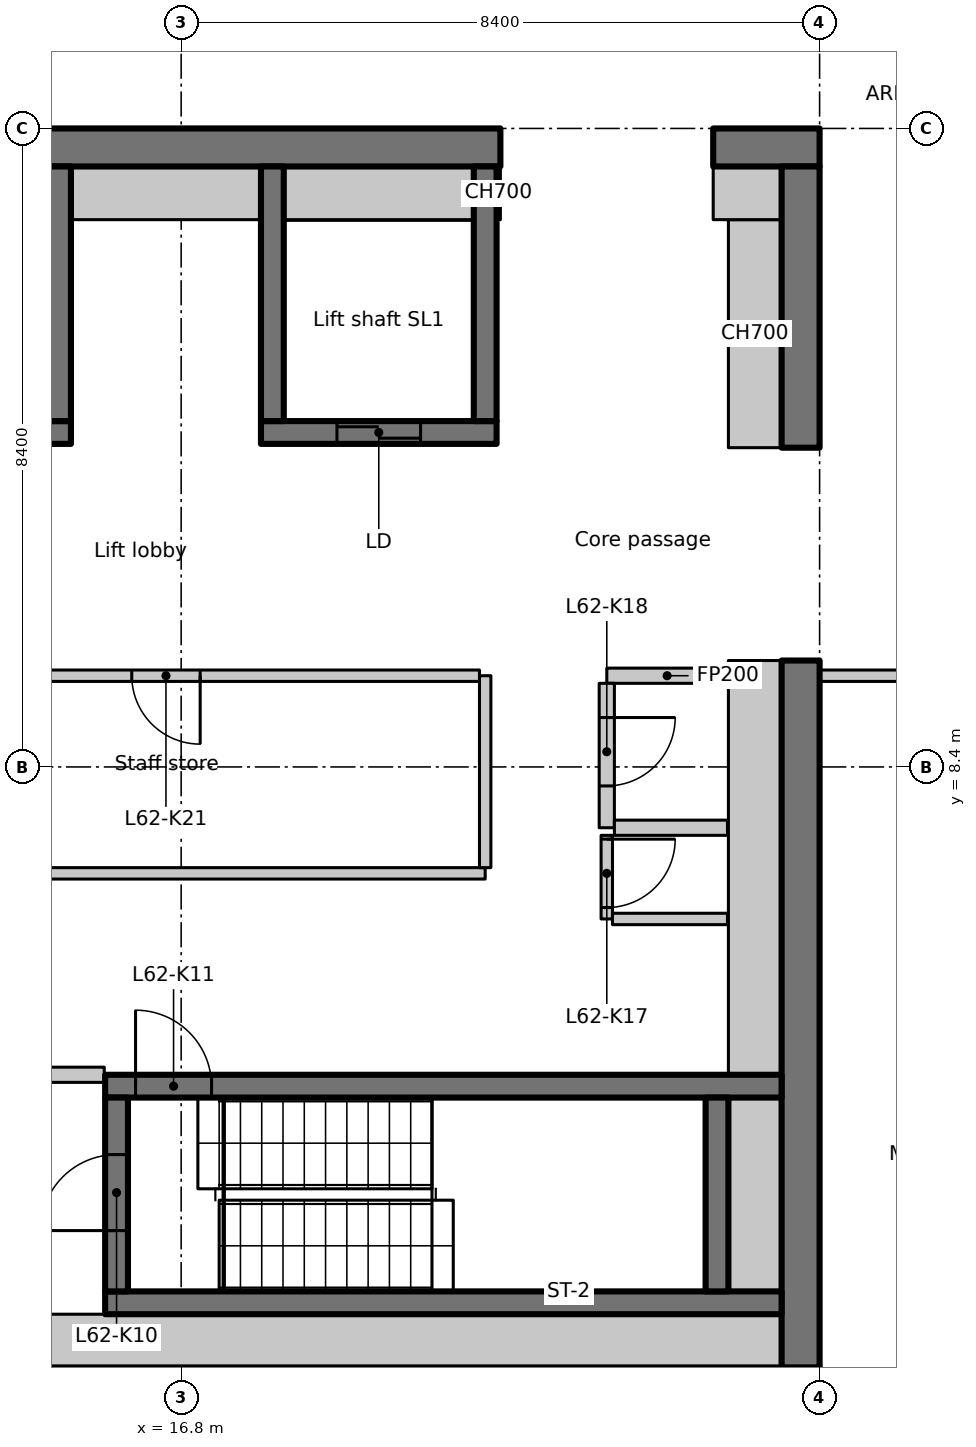
"""IFC4 building model, lengths in metres.
Left out: names, types, materials, properties, quantities, classifications, styles, units other than length and angle.
Written with IfcOpenShell. Run it as: python <this file> out.ifc"""

import sys

from ifc_helpers import new_model, si_unit, direction, frame, frame_2d, origin, place, context, subcontext, project, spatial, rectangle, extrude, element, fill, save


model = new_model("IFC4")
c1 = context("Model", 3, precision=1e-05, world=origin(), true_north=direction((0.0, 1.0)))
c2 = subcontext(c1, "Body", "Model", "MODEL_VIEW")
j1 = project(units=[si_unit("LENGTHUNIT", "METRE"), si_unit("PLANEANGLEUNIT", "RADIAN")], contexts=[c1])
p1 = place(None, origin())
s1 = spatial("IfcSite", under=j1, at=p1, CompositionType="ELEMENT")
p2 = place(p1, origin())
s2 = spatial("IfcBuilding", under=s1, at=p2, CompositionType="ELEMENT")
p3 = place(p2, frame((0.0, 0.0, 244.5)))
s3 = spatial("IfcBuildingStorey", under=s2, at=p3, CompositionType="ELEMENT", Elevation=244.5)
p4 = place(p3, frame((-1.1, 16.55, 0.0), z_axis=(0.0, 0.0, 1.0), x_axis=(1.0, 0.0, 0.0)))
e1 = element("IfcWall", 1, at=p4, inside=s3, PredefinedType="SHEAR", context=c2, shape_type="SweptSolid", body=[
    extrude(rectangle(XDim=22.1, YDim=0.5, at=frame_2d((11.05, 0.0))), origin(), (0.0, 0.0, 1.0), 3.35),
])
p5 = place(p4, frame((3.15, 0.0, 0.0)))
e2 = element("IfcOpeningElement", 2, at=p5, cuts=e1, PredefinedType="OPENING", context=c2, shape_type="SweptSolid", body=[
    extrude(rectangle(XDim=1.1, YDim=2.3, at=frame_2d((0.55, 1.15))), frame((0.0, 0.26, 0.0), z_axis=(0.0, -1.0, 0.0), x_axis=(1.0, 0.0, 0.0)), (0.0, 0.0, 1.0), 0.52),
])
p6 = place(p3, frame((23.8, 16.55, 0.0), z_axis=(0.0, 0.0, 1.0), x_axis=(1.0, 0.0, 0.0)))
e3 = element("IfcWall", 3, at=p6, inside=s3, PredefinedType="SHEAR", context=c2, shape_type="SweptSolid", body=[
    extrude(rectangle(XDim=1.4, YDim=0.5, at=frame_2d((0.7, 0.0))), origin(), (0.0, 0.0, 1.0), 3.35),
])
p7 = place(p3, frame((24.95, 0.5, 0.0), z_axis=(0.0, 0.0, 1.0), x_axis=(0.0, 1.0, 0.0)))
e4 = element("IfcWall", 4, at=p7, inside=s3, PredefinedType="SHEAR", context=c2, shape_type="SweptSolid", body=[
    extrude(rectangle(XDim=9.3, YDim=0.5, at=frame_2d((4.65, 0.0))), origin(), (0.0, 0.0, 1.0), 3.35),
])
p8 = place(p3, frame((24.95, 12.6, 0.0), z_axis=(0.0, 0.0, 1.0), x_axis=(0.0, 1.0, 0.0)))
e5 = element("IfcWall", 5, at=p8, inside=s3, PredefinedType="SHEAR", context=c2, shape_type="SweptSolid", body=[
    extrude(rectangle(XDim=3.7, YDim=0.5, at=frame_2d((1.85, 0.0))), origin(), (0.0, 0.0, 1.0), 3.35),
])
p9 = place(p3, frame((24.35, 12.6, 0.0), z_axis=(0.0, 0.0, 1.0), x_axis=(0.0, 1.0, 0.0)))
e6 = element("IfcWall", 6, at=p9, inside=s3, PredefinedType="PARTITIONING", context=c2, shape_type="SweptSolid", body=[
    extrude(rectangle(XDim=3.0, YDim=0.7, at=frame_2d((1.5, 0.0))), origin(), (0.0, 0.0, 1.0), 3.35),
])
p10 = place(p3, frame((23.8, 15.95, 0.0), z_axis=(0.0, 0.0, 1.0), x_axis=(1.0, 0.0, 0.0)))
e7 = element("IfcWall", 7, at=p10, inside=s3, PredefinedType="PARTITIONING", context=c2, shape_type="SweptSolid", body=[
    extrude(rectangle(XDim=0.9, YDim=0.7, at=frame_2d((0.45, 0.0))), origin(), (0.0, 0.0, 1.0), 3.35),
])
p11 = place(p3, frame((0.5, 12.8, 0.0), z_axis=(0.0, 0.0, 1.0), x_axis=(1.0, 0.0, 0.0)))
e8 = element("IfcWall", 8, at=p11, inside=s3, PredefinedType="SHEAR", context=c2, shape_type="SweptSolid", body=[
    extrude(rectangle(XDim=14.85, YDim=0.3, at=frame_2d((7.425, 0.0))), origin(), (0.0, 0.0, 1.0), 3.35),
])
p12 = place(p11, frame((4.35, 0.0, 0.0)))
e9 = element("IfcOpeningElement", 9, at=p12, cuts=e8, PredefinedType="OPENING", context=c2, shape_type="SweptSolid", body=[
    extrude(rectangle(XDim=1.1, YDim=2.3, at=frame_2d((0.55, 1.15))), frame((0.0, 0.16, 0.0), z_axis=(0.0, -1.0, 0.0), x_axis=(1.0, 0.0, 0.0)), (0.0, 0.0, 1.0), 0.32),
])
p13 = place(p11, frame((7.15, 0.0, 0.0)))
e10 = element("IfcOpeningElement", 10, at=p13, cuts=e8, PredefinedType="OPENING", context=c2, shape_type="SweptSolid", body=[
    extrude(rectangle(XDim=1.1, YDim=2.3, at=frame_2d((0.55, 1.15))), frame((0.0, 0.16, 0.0), z_axis=(0.0, -1.0, 0.0), x_axis=(1.0, 0.0, 0.0)), (0.0, 0.0, 1.0), 0.32),
])
p14 = place(p11, frame((9.95, 0.0, 0.0)))
e11 = element("IfcOpeningElement", 11, at=p14, cuts=e8, PredefinedType="OPENING", context=c2, shape_type="SweptSolid", body=[
    extrude(rectangle(XDim=1.1, YDim=2.3, at=frame_2d((0.55, 1.15))), frame((0.0, 0.16, 0.0), z_axis=(0.0, -1.0, 0.0), x_axis=(1.0, 0.0, 0.0)), (0.0, 0.0, 1.0), 0.32),
])
p15 = place(p11, frame((12.75, 0.0, 0.0)))
e12 = element("IfcOpeningElement", 12, at=p15, cuts=e8, PredefinedType="OPENING", context=c2, shape_type="SweptSolid", body=[
    extrude(rectangle(XDim=1.1, YDim=2.3, at=frame_2d((0.55, 1.15))), frame((0.0, 0.16, 0.0), z_axis=(0.0, -1.0, 0.0), x_axis=(1.0, 0.0, 0.0)), (0.0, 0.0, 1.0), 0.32),
])
p16 = place(p3, frame((15.2, 12.95, 0.0), z_axis=(0.0, 0.0, 1.0), x_axis=(0.0, 1.0, 0.0)))
e13 = element("IfcWall", 13, at=p16, inside=s3, PredefinedType="SHEAR", context=c2, shape_type="SweptSolid", body=[
    extrude(rectangle(XDim=3.35, YDim=0.3, at=frame_2d((1.675, 0.0))), origin(), (0.0, 0.0, 1.0), 3.35),
])
p17 = place(p3, frame((17.85, 12.8, 0.0), z_axis=(0.0, 0.0, 1.0), x_axis=(1.0, 0.0, 0.0)))
e14 = element("IfcWall", 14, at=p17, inside=s3, PredefinedType="SHEAR", context=c2, shape_type="SweptSolid", body=[
    extrude(rectangle(XDim=3.1, YDim=0.3, at=frame_2d((1.55, 0.0))), origin(), (0.0, 0.0, 1.0), 3.35),
])
p18 = place(p17, frame((1.0, 0.0, 0.0)))
e15 = element("IfcOpeningElement", 15, at=p18, cuts=e14, PredefinedType="OPENING", context=c2, shape_type="SweptSolid", body=[
    extrude(rectangle(XDim=1.1, YDim=2.3, at=frame_2d((0.55, 1.15))), frame((0.0, 0.16, 0.0), z_axis=(0.0, -1.0, 0.0), x_axis=(1.0, 0.0, 0.0)), (0.0, 0.0, 1.0), 0.32),
])
for number, where, z_axis, x_axis in (
    (16, (18.0, 12.95, 0.0), (0.0, 0.0, 1.0), (0.0, 1.0, 0.0)),
    (17, (20.8, 12.95, 0.0), (0.0, 0.0, 1.0), (0.0, 1.0, 0.0)),
):
    element("IfcWall", number, at=place(p3, frame(where, z_axis=z_axis, x_axis=x_axis)), inside=s3, PredefinedType="SHEAR", context=c2, shape_type="SweptSolid", body=[
        extrude(rectangle(XDim=3.35, YDim=0.3, at=frame_2d((1.675, 0.0))), origin(), (0.0, 0.0, 1.0), 3.35),
    ])
p19 = place(p3, frame((15.8, 1.35, 0.0), z_axis=(0.0, 0.0, 1.0), x_axis=(1.0, 0.0, 0.0)))
e18 = element("IfcWall", 18, at=p19, inside=s3, PredefinedType="SHEAR", context=c2, shape_type="SweptSolid", body=[
    extrude(rectangle(XDim=8.9, YDim=0.3, at=frame_2d((4.45, 0.0))), origin(), (0.0, 0.0, 1.0), 3.35),
])
p20 = place(p3, frame((15.8, 4.2, 0.0), z_axis=(0.0, 0.0, 1.0), x_axis=(1.0, 0.0, 0.0)))
e19 = element("IfcWall", 19, at=p20, inside=s3, PredefinedType="SHEAR", context=c2, shape_type="SweptSolid", body=[
    extrude(rectangle(XDim=8.9, YDim=0.3, at=frame_2d((4.45, 0.0))), origin(), (0.0, 0.0, 1.0), 3.35),
])
p21 = place(p20, frame((0.4, 0.0, 0.0)))
e20 = element("IfcOpeningElement", 20, at=p21, cuts=e19, PredefinedType="OPENING", context=c2, shape_type="SweptSolid", body=[
    extrude(rectangle(XDim=1.0, YDim=2.1, at=frame_2d((0.5, 1.05))), frame((0.0, 0.16, 0.0), z_axis=(0.0, -1.0, 0.0), x_axis=(1.0, 0.0, 0.0)), (0.0, 0.0, 1.0), 0.32),
])
p22 = place(p3, frame((15.95, 1.5, 0.0), z_axis=(0.0, 0.0, 1.0), x_axis=(0.0, 1.0, 0.0)))
e21 = element("IfcWall", 21, at=p22, inside=s3, PredefinedType="SHEAR", context=c2, shape_type="SweptSolid", body=[
    extrude(rectangle(XDim=2.55, YDim=0.3, at=frame_2d((1.275, 0.0))), origin(), (0.0, 0.0, 1.0), 3.35),
])
p23 = place(p22, frame((0.8, 0.0, 0.0)))
e22 = element("IfcOpeningElement", 22, at=p23, cuts=e21, PredefinedType="OPENING", context=c2, shape_type="SweptSolid", body=[
    extrude(rectangle(XDim=1.0, YDim=2.1, at=frame_2d((0.5, 1.05))), frame((0.0, 0.16, 0.0), z_axis=(0.0, -1.0, 0.0), x_axis=(1.0, 0.0, 0.0)), (0.0, 0.0, 1.0), 0.32),
])
p24 = place(p3, frame((23.85, 1.5, 0.0), z_axis=(0.0, 0.0, 1.0), x_axis=(0.0, 1.0, 0.0)))
e23 = element("IfcWall", 23, at=p24, inside=s3, PredefinedType="SHEAR", context=c2, shape_type="SweptSolid", body=[
    extrude(rectangle(XDim=2.55, YDim=0.3, at=frame_2d((1.275, 0.0))), origin(), (0.0, 0.0, 1.0), 3.35),
])
p25 = place(p3, frame((13.362, 4.35, 0.0), z_axis=(0.0, 0.0, 1.0), x_axis=(1.0, 0.0, 0.0)))
e24 = element("IfcWall", 24, at=p25, inside=s3, PredefinedType="PARTITIONING", context=c2, shape_type="SweptSolid", body=[
    extrude(rectangle(XDim=2.426, YDim=0.2, at=frame_2d((1.213, 0.0))), origin(), (0.0, 0.0, 1.0), 3.35),
])
p26 = place(p25, frame((0.638, 0.0, 0.0)))
e25 = element("IfcOpeningElement", 25, at=p26, cuts=e24, PredefinedType="OPENING", context=c2, shape_type="SweptSolid", body=[
    extrude(rectangle(XDim=1.0, YDim=2.1, at=frame_2d((0.5, 1.05))), frame((0.0, 0.11, 0.0), z_axis=(0.0, -1.0, 0.0), x_axis=(1.0, 0.0, 0.0)), (0.0, 0.0, 1.0), 0.22),
])
p27 = place(p3, frame((23.988, 9.6, 0.0), z_axis=(0.0, 0.0, 1.0), x_axis=(-1.0, 0.0, 0.0)))
e26 = element("IfcWall", 26, at=p27, inside=s3, PredefinedType="PARTITIONING", context=c2, shape_type="SweptSolid", body=[
    extrude(rectangle(XDim=1.588, YDim=0.2, at=frame_2d((0.794, 0.0))), origin(), (0.0, 0.0, 1.0), 3.35),
])
p28 = place(p3, frame((22.4, 9.5, 0.0), z_axis=(0.0, 0.0, 1.0), x_axis=(0.0, -1.0, 0.0)))
e27 = element("IfcWall", 27, at=p28, inside=s3, PredefinedType="PARTITIONING", context=c2, shape_type="SweptSolid", body=[
    extrude(rectangle(XDim=1.9, YDim=0.2, at=frame_2d((0.95, 0.0))), origin(), (0.0, 0.0, 1.0), 3.35),
])
p29 = place(p28, frame((0.45, 0.0, 0.0)))
e28 = element("IfcOpeningElement", 28, at=p29, cuts=e27, PredefinedType="OPENING", context=c2, shape_type="SweptSolid", body=[
    extrude(rectangle(XDim=0.9, YDim=2.1, at=frame_2d((0.45, 1.05))), frame((0.0, 0.11, 0.0), z_axis=(0.0, -1.0, 0.0), x_axis=(1.0, 0.0, 0.0)), (0.0, 0.0, 1.0), 0.22),
])
p30 = place(p3, frame((22.5, 7.6, 0.0), z_axis=(0.0, 0.0, 1.0), x_axis=(1.0, 0.0, 0.0)))
e29 = element("IfcWall", 29, at=p30, inside=s3, PredefinedType="PARTITIONING", context=c2, shape_type="SweptSolid", body=[
    extrude(rectangle(XDim=1.488, YDim=0.2, at=frame_2d((0.744, 0.0))), origin(), (0.0, 0.0, 1.0), 3.35),
])
p31 = place(p3, frame((12.5, 7.0, 0.0), z_axis=(0.0, 0.0, 1.0), x_axis=(1.0, 0.0, 0.0)))
e30 = element("IfcWall", 30, at=p31, inside=s3, PredefinedType="PARTITIONING", context=c2, shape_type="SweptSolid", body=[
    extrude(rectangle(XDim=8.3, YDim=0.15, at=frame_2d((4.15, 0.0))), origin(), (0.0, 0.0, 1.0), 3.35),
])
p32 = place(p3, frame((20.8, 7.075, 0.0), z_axis=(0.0, 0.0, 1.0), x_axis=(0.0, 1.0, 0.0)))
e31 = element("IfcWall", 31, at=p32, inside=s3, PredefinedType="PARTITIONING", context=c2, shape_type="SweptSolid", body=[
    extrude(rectangle(XDim=2.525, YDim=0.15, at=frame_2d((1.263, 0.0))), origin(), (0.0, 0.0, 1.0), 3.35),
])
p33 = place(p3, frame((20.725, 9.6, 0.0), z_axis=(0.0, 0.0, 1.0), x_axis=(-1.0, 0.0, 0.0)))
e32 = element("IfcWall", 32, at=p33, inside=s3, PredefinedType="PARTITIONING", context=c2, shape_type="SweptSolid", body=[
    extrude(rectangle(XDim=8.225, YDim=0.15, at=frame_2d((4.113, 0.0))), origin(), (0.0, 0.0, 1.0), 3.35),
])
p34 = place(p33, frame((3.675, 0.0, 0.0)))
e33 = element("IfcOpeningElement", 33, at=p34, cuts=e32, PredefinedType="OPENING", context=c2, shape_type="SweptSolid", body=[
    extrude(rectangle(XDim=0.9, YDim=2.1, at=frame_2d((0.45, 1.05))), frame((0.0, 0.085, 0.0), z_axis=(0.0, -1.0, 0.0), x_axis=(1.0, 0.0, 0.0)), (0.0, 0.0, 1.0), 0.17),
])
p35 = place(p3, frame((22.4, 7.5, 0.0), z_axis=(0.0, 0.0, 1.0), x_axis=(0.0, -1.0, 0.0)))
e34 = element("IfcWall", 34, at=p35, inside=s3, PredefinedType="PARTITIONING", context=c2, shape_type="SweptSolid", body=[
    extrude(rectangle(XDim=1.1, YDim=0.15, at=frame_2d((0.55, 0.0))), origin(), (0.0, 0.0, 1.0), 3.35),
])
p36 = place(p35, frame((0.05, 0.0, 0.0)))
e35 = element("IfcOpeningElement", 35, at=p36, cuts=e34, PredefinedType="OPENING", context=c2, shape_type="SweptSolid", body=[
    extrude(rectangle(XDim=0.9, YDim=2.1, at=frame_2d((0.45, 1.05))), frame((0.0, 0.085, 0.0), z_axis=(0.0, -1.0, 0.0), x_axis=(1.0, 0.0, 0.0)), (0.0, 0.0, 1.0), 0.17),
])
p37 = place(p3, frame((22.475, 6.4, 0.0), z_axis=(0.0, 0.0, 1.0), x_axis=(1.0, 0.0, 0.0)))
e36 = element("IfcWall", 36, at=p37, inside=s3, PredefinedType="PARTITIONING", context=c2, shape_type="SweptSolid", body=[
    extrude(rectangle(XDim=1.513, YDim=0.15, at=frame_2d((0.756, 0.0))), origin(), (0.0, 0.0, 1.0), 3.35),
])
for number, where, z_axis, x_axis in (
    (37, (15.35, 15.95, 0.0), (0.0, 0.0, 1.0), (1.0, 0.0, 0.0)),
    (38, (18.15, 15.95, 0.0), (0.0, 0.0, 1.0), (1.0, 0.0, 0.0)),
):
    element("IfcWall", number, at=place(p3, frame(where, z_axis=z_axis, x_axis=x_axis)), inside=s3, PredefinedType="PARTITIONING", context=c2, shape_type="SweptSolid", body=[
        extrude(rectangle(XDim=2.5, YDim=0.7, at=frame_2d((1.25, 0.0))), origin(), (0.0, 0.0, 1.0), 3.35),
    ])
p38 = place(p3, frame((20.95, 15.95, 0.0), z_axis=(0.0, 0.0, 1.0), x_axis=(1.0, 0.0, 0.0)))
e39 = element("IfcWall", 39, at=p38, inside=s3, PredefinedType="PARTITIONING", context=c2, shape_type="SweptSolid", body=[
    extrude(rectangle(XDim=0.05, YDim=0.7, at=frame_2d((0.025, 0.0))), origin(), (0.0, 0.0, 1.0), 3.35),
])
p39 = place(p3, frame((13.35, 0.85, 0.0), z_axis=(0.0, 0.0, 1.0), x_axis=(1.0, 0.0, 0.0)))
e40 = element("IfcWall", 40, at=p39, inside=s3, PredefinedType="PARTITIONING", context=c2, shape_type="SweptSolid", body=[
    extrude(rectangle(XDim=11.35, YDim=0.7, at=frame_2d((5.675, 0.0))), origin(), (0.0, 0.0, 1.0), 3.35),
])
p40 = place(p3, frame((24.35, 1.5, 0.0), z_axis=(0.0, 0.0, 1.0), x_axis=(0.0, 1.0, 0.0)))
e41 = element("IfcWall", 41, at=p40, inside=s3, PredefinedType="PARTITIONING", context=c2, shape_type="SweptSolid", body=[
    extrude(rectangle(XDim=2.55, YDim=0.7, at=frame_2d((1.275, 0.0))), origin(), (0.0, 0.0, 1.0), 3.35),
])
p41 = place(p3, frame((24.35, 4.35, 0.0), z_axis=(0.0, 0.0, 1.0), x_axis=(0.0, 1.0, 0.0)))
e42 = element("IfcWall", 42, at=p41, inside=s3, PredefinedType="PARTITIONING", context=c2, shape_type="SweptSolid", body=[
    extrude(rectangle(XDim=5.45, YDim=0.7, at=frame_2d((2.725, 0.0))), origin(), (0.0, 0.0, 1.0), 3.35),
])
p42 = place(p3, frame((29.4, 9.6, 0.0), z_axis=(0.0, 0.0, 1.0), x_axis=(-1.0, 0.0, 0.0)))
e43 = element("IfcWall", 43, at=p42, inside=s3, PredefinedType="PARTITIONING", context=c2, shape_type="SweptSolid", body=[
    extrude(rectangle(XDim=4.2, YDim=0.15, at=frame_2d((2.1, 0.0))), origin(), (0.0, 0.0, 1.0), 3.33),
])
p43 = place(p42, frame((1.5, 0.0, 0.0)))
e44 = element("IfcOpeningElement", 44, at=p43, cuts=e43, PredefinedType="OPENING", context=c2, shape_type="SweptSolid", body=[
    extrude(rectangle(XDim=1.1, YDim=2.1, at=frame_2d((0.55, 1.05))), frame((0.0, 0.085, 0.0), z_axis=(0.0, -1.0, 0.0), x_axis=(1.0, 0.0, 0.0)), (0.0, 0.0, 1.0), 0.17),
])
p44 = place(p18, origin())
e45 = element("IfcDoor", 45, at=p44, inside=s3, OperationType="SLIDING_TO_LEFT", PredefinedType="DOOR", context=c2, shape_type="SweptSolid", body=[
    extrude(rectangle(XDim=1.1, YDim=2.3, at=frame_2d((0.55, 1.15))), frame((0.0, 0.025, 0.0), z_axis=(0.0, -1.0, 0.0), x_axis=(1.0, 0.0, 0.0)), (0.0, 0.0, 1.0), 0.05),
])
fill(e15, e45)
p45 = place(p23, origin())
e46 = element("IfcDoor", 46, at=p45, inside=s3, OperationType="SINGLE_SWING_RIGHT", PredefinedType="DOOR", context=c2, shape_type="SweptSolid", body=[
    extrude(rectangle(XDim=1.0, YDim=2.1, at=frame_2d((0.5, 1.05))), frame((0.0, 0.025, 0.0), z_axis=(0.0, -1.0, 0.0), x_axis=(1.0, 0.0, 0.0)), (0.0, 0.0, 1.0), 0.05),
])
fill(e22, e46)
p46 = place(p21, origin())
e47 = element("IfcDoor", 47, at=p46, inside=s3, OperationType="SINGLE_SWING_LEFT", PredefinedType="DOOR", context=c2, shape_type="SweptSolid", body=[
    extrude(rectangle(XDim=1.0, YDim=2.1, at=frame_2d((0.5, 1.05))), frame((0.0, 0.025, 0.0), z_axis=(0.0, -1.0, 0.0), x_axis=(1.0, 0.0, 0.0)), (0.0, 0.0, 1.0), 0.05),
])
fill(e20, e47)
p47 = place(p36, origin())
e48 = element("IfcDoor", 48, at=p47, inside=s3, OperationType="SINGLE_SWING_LEFT", PredefinedType="DOOR", context=c2, shape_type="SweptSolid", body=[
    extrude(rectangle(XDim=0.9, YDim=2.1, at=frame_2d((0.45, 1.05))), frame((0.0, 0.025, 0.0), z_axis=(0.0, -1.0, 0.0), x_axis=(1.0, 0.0, 0.0)), (0.0, 0.0, 1.0), 0.05),
])
fill(e35, e48)
p48 = place(p29, origin())
e49 = element("IfcDoor", 49, at=p48, inside=s3, OperationType="SINGLE_SWING_RIGHT", PredefinedType="DOOR", context=c2, shape_type="SweptSolid", body=[
    extrude(rectangle(XDim=0.9, YDim=2.1, at=frame_2d((0.45, 1.05))), frame((0.0, 0.025, 0.0), z_axis=(0.0, -1.0, 0.0), x_axis=(1.0, 0.0, 0.0)), (0.0, 0.0, 1.0), 0.05),
])
fill(e28, e49)
p49 = place(p34, origin())
e50 = element("IfcDoor", 50, at=p49, inside=s3, OperationType="SINGLE_SWING_LEFT", PredefinedType="DOOR", context=c2, shape_type="SweptSolid", body=[
    extrude(rectangle(XDim=0.9, YDim=2.1, at=frame_2d((0.45, 1.05))), frame((0.0, 0.025, 0.0), z_axis=(0.0, -1.0, 0.0), x_axis=(1.0, 0.0, 0.0)), (0.0, 0.0, 1.0), 0.05),
])
fill(e33, e50)
save(model, sys.argv[1])
